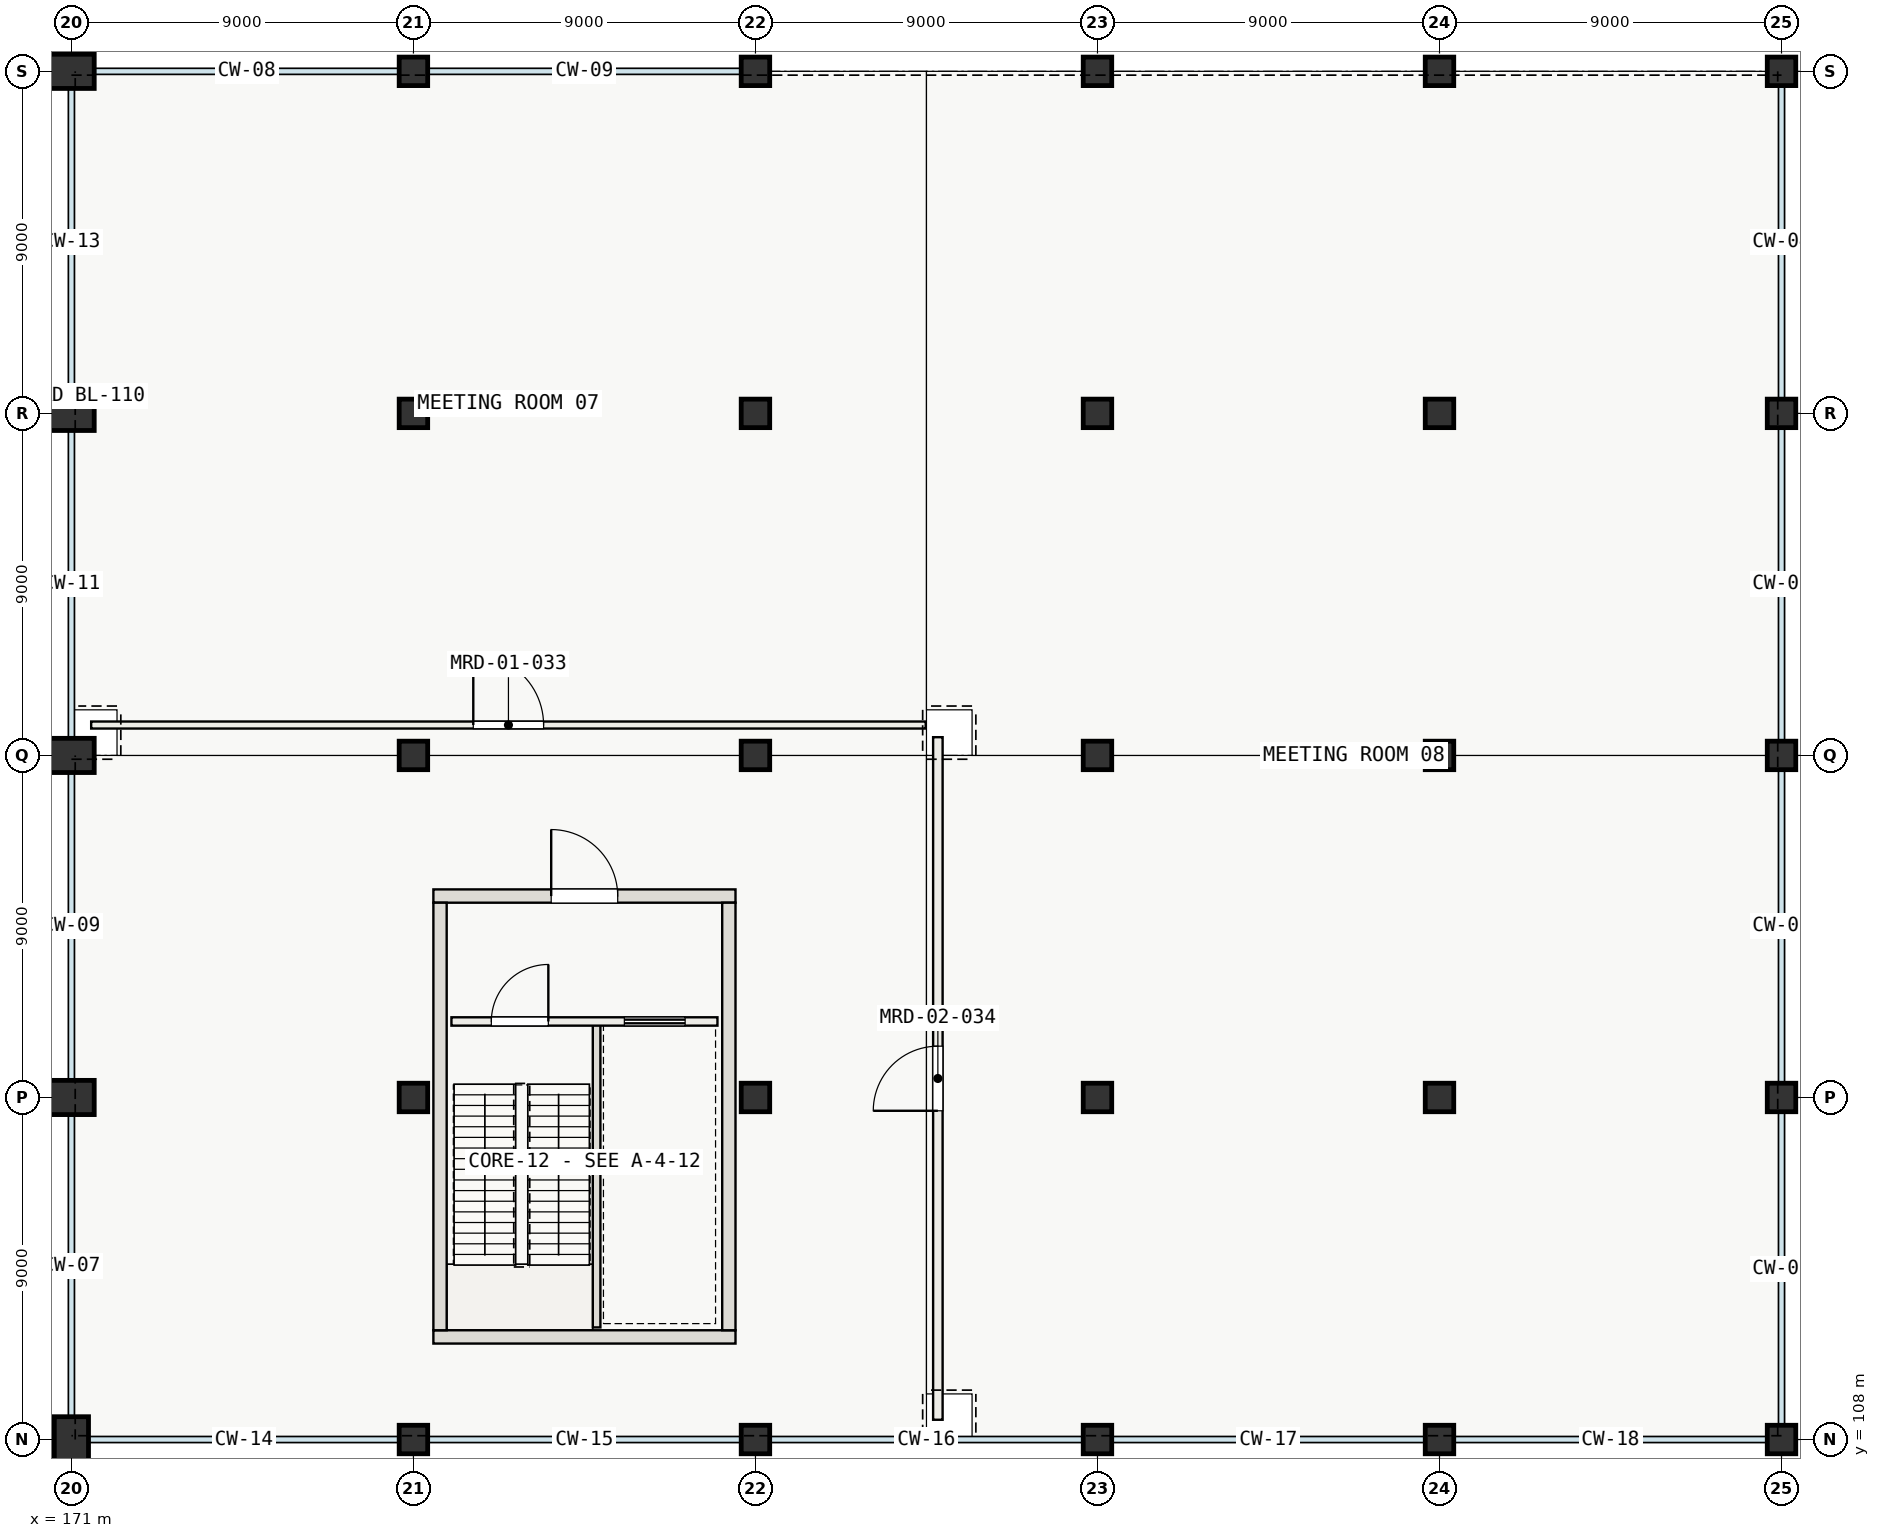
"""IFC4 building model, lengths in metres.
Left out: names, types, materials, properties, quantities, classifications, styles, units other than length and angle.
Written with IfcOpenShell. Run it as: python <this file> out.ifc"""

import sys

from ifc_helpers import new_model, si_unit, direction, frame, frame_2d, origin, origin_2d, place, context, subcontext, project, spatial, rectangle, extrude, element, fill, save


model = new_model("IFC4")
c1 = context("Model", 3, precision=1e-05, world=origin(), true_north=direction((0.0, 1.0)))
c2 = subcontext(c1, "Body", "Model", "MODEL_VIEW")
j1 = project(units=[si_unit("LENGTHUNIT", "METRE"), si_unit("PLANEANGLEUNIT", "RADIAN")], contexts=[c1])
p1 = place(None, origin())
s1 = spatial("IfcSite", under=j1, at=p1, CompositionType="ELEMENT")
p2 = place(p1, origin())
s2 = spatial("IfcBuilding", under=s1, at=p2, CompositionType="ELEMENT")
p3 = place(p2, frame((0.0, 0.0, 6.0)))
s3 = spatial("IfcBuildingStorey", under=s2, at=p3, CompositionType="ELEMENT", Elevation=6.0)
p4 = place(p3, frame((180.525, 110.7, 0.0), z_axis=(0.0, 0.0, 1.0), x_axis=(1.0, 0.0, 0.0)))
e1 = element("IfcWall", 1, at=p4, inside=s3, PredefinedType="SHEAR", context=c2, shape_type="SweptSolid", body=[
    extrude(rectangle(XDim=7.95, YDim=0.35, at=frame_2d((3.975, 0.0))), origin(), (0.0, 0.0, 1.0), 6.0),
])
p5 = place(p3, frame((180.525, 122.3, 0.0), z_axis=(0.0, 0.0, 1.0), x_axis=(1.0, 0.0, 0.0)))
e2 = element("IfcWall", 2, at=p5, inside=s3, PredefinedType="SHEAR", context=c2, shape_type="SweptSolid", body=[
    extrude(rectangle(XDim=7.95, YDim=0.35, at=frame_2d((3.975, 0.0))), origin(), (0.0, 0.0, 1.0), 6.0),
])
p6 = place(p5, frame((3.1, 0.0, 0.0)))
e3 = element("IfcOpeningElement", 3, at=p6, cuts=e2, PredefinedType="OPENING", context=c2, shape_type="SweptSolid", body=[
    extrude(rectangle(XDim=1.75, YDim=2.3, at=frame_2d((0.875, 1.15))), frame((0.0, 0.185, 0.0), z_axis=(0.0, -1.0, 0.0), x_axis=(1.0, 0.0, 0.0)), (0.0, 0.0, 1.0), 0.37),
])
for number, where, z_axis, x_axis in (
    (4, (180.7, 110.875, 0.0), (0.0, 0.0, 1.0), (0.0, 1.0, 0.0)),
    (5, (188.3, 110.875, 0.0), (0.0, 0.0, 1.0), (0.0, 1.0, 0.0)),
):
    element("IfcWall", number, at=place(p3, frame(where, z_axis=z_axis, x_axis=x_axis)), inside=s3, PredefinedType="SHEAR", context=c2, shape_type="SweptSolid", body=[
        extrude(rectangle(XDim=11.25, YDim=0.35, at=frame_2d((5.625, 0.0))), origin(), (0.0, 0.0, 1.0), 6.0),
    ])
for number, where, z_axis, x_axis in (
    (6, (171.0, 108.0, 0.0), (0.0, 0.0, 1.0), (0.0, 1.0, 0.0)),
    (7, (171.0, 117.0, 0.0), (0.0, 0.0, 1.0), (1.0, 0.0, 0.0)),
    (8, (171.0, 126.0, 0.0), (0.0, 0.0, 1.0), (1.0, 0.0, 0.0)),
    (9, (171.0, 135.0, 0.0), (0.0, 0.0, 1.0), (1.0, 0.0, 0.0)),
    (10, (171.0, 144.0, 0.0), (0.0, 0.0, 1.0), (1.0, 0.0, 0.0)),
):
    element("IfcColumn", number, at=place(p3, frame(where, z_axis=z_axis, x_axis=x_axis)), inside=s3, PredefinedType="COLUMN", context=c2, shape_type="SweptSolid", body=[
        extrude(rectangle(XDim=1.2, YDim=0.9, at=origin_2d()), origin(), (0.0, 0.0, 1.0), 6.0),
    ])
for number, where, z_axis, x_axis in (
    (11, (180.0, 108.0, 0.0), (0.0, 0.0, 1.0), (1.0, 0.0, 0.0)),
    (12, (180.0, 117.0, 0.0), (0.0, 0.0, 1.0), (1.0, 0.0, 0.0)),
    (13, (180.0, 126.0, 0.0), (0.0, 0.0, 1.0), (1.0, 0.0, 0.0)),
    (14, (180.0, 135.0, 0.0), (0.0, 0.0, 1.0), (1.0, 0.0, 0.0)),
    (15, (180.0, 144.0, 0.0), (0.0, 0.0, 1.0), (1.0, 0.0, 0.0)),
    (16, (189.0, 108.0, 0.0), (0.0, 0.0, 1.0), (1.0, 0.0, 0.0)),
    (17, (189.0, 117.0, 0.0), (0.0, 0.0, 1.0), (1.0, 0.0, 0.0)),
    (18, (189.0, 126.0, 0.0), (0.0, 0.0, 1.0), (1.0, 0.0, 0.0)),
    (19, (189.0, 135.0, 0.0), (0.0, 0.0, 1.0), (1.0, 0.0, 0.0)),
    (20, (189.0, 144.0, 0.0), (0.0, 0.0, 1.0), (1.0, 0.0, 0.0)),
    (21, (198.0, 108.0, 0.0), (0.0, 0.0, 1.0), (1.0, 0.0, 0.0)),
    (22, (198.0, 117.0, 0.0), (0.0, 0.0, 1.0), (1.0, 0.0, 0.0)),
    (23, (198.0, 126.0, 0.0), (0.0, 0.0, 1.0), (1.0, 0.0, 0.0)),
    (24, (198.0, 135.0, 0.0), (0.0, 0.0, 1.0), (1.0, 0.0, 0.0)),
    (25, (198.0, 144.0, 0.0), (0.0, 0.0, 1.0), (1.0, 0.0, 0.0)),
    (26, (207.0, 108.0, 0.0), (0.0, 0.0, 1.0), (1.0, 0.0, 0.0)),
    (27, (207.0, 117.0, 0.0), (0.0, 0.0, 1.0), (1.0, 0.0, 0.0)),
    (28, (207.0, 126.0, 0.0), (0.0, 0.0, 1.0), (1.0, 0.0, 0.0)),
    (29, (207.0, 135.0, 0.0), (0.0, 0.0, 1.0), (1.0, 0.0, 0.0)),
    (30, (207.0, 144.0, 0.0), (0.0, 0.0, 1.0), (1.0, 0.0, 0.0)),
    (31, (216.0, 108.0, 0.0), (0.0, 0.0, 1.0), (1.0, 0.0, 0.0)),
    (32, (216.0, 117.0, 0.0), (0.0, 0.0, 1.0), (1.0, 0.0, 0.0)),
    (33, (216.0, 126.0, 0.0), (0.0, 0.0, 1.0), (1.0, 0.0, 0.0)),
    (34, (216.0, 135.0, 0.0), (0.0, 0.0, 1.0), (1.0, 0.0, 0.0)),
    (35, (216.0, 144.0, 0.0), (0.0, 0.0, 1.0), (1.0, 0.0, 0.0)),
):
    element("IfcColumn", number, at=place(p3, frame(where, z_axis=z_axis, x_axis=x_axis)), inside=s3, PredefinedType="COLUMN", context=c2, shape_type="SweptSolid", body=[
        extrude(rectangle(XDim=0.75, YDim=0.75, at=origin_2d()), origin(), (0.0, 0.0, 1.0), 6.0),
    ])
p7 = place(p3, frame((184.82, 110.95, 0.0), z_axis=(0.0, 0.0, 1.0), x_axis=(0.0, 1.0, 0.0)))
e36 = element("IfcWall", 36, at=p7, inside=s3, PredefinedType="SOLIDWALL", context=c2, shape_type="SweptSolid", body=[
    extrude(rectangle(XDim=8.0, YDim=0.2, at=frame_2d((4.0, 0.0))), origin(), (0.0, 0.0, 1.0), 6.0),
])
p8 = place(p3, frame((181.0, 119.0, 0.0), z_axis=(0.0, 0.0, 1.0), x_axis=(1.0, 0.0, 0.0)))
e37 = element("IfcWall", 37, at=p8, inside=s3, PredefinedType="SOLIDWALL", context=c2, shape_type="SweptSolid", body=[
    extrude(rectangle(XDim=7.0, YDim=0.22, at=frame_2d((3.5, 0.0))), origin(), (0.0, 0.0, 1.0), 5.62),
])
p9 = place(p8, frame((1.05, 0.0, 0.0)))
e38 = element("IfcOpeningElement", 38, at=p9, cuts=e37, PredefinedType="OPENING", context=c2, shape_type="SweptSolid", body=[
    extrude(rectangle(XDim=1.5, YDim=2.2, at=frame_2d((0.75, 1.1))), frame((0.0, 0.12, 0.0), z_axis=(0.0, -1.0, 0.0), x_axis=(1.0, 0.0, 0.0)), (0.0, 0.0, 1.0), 0.24),
])
p10 = place(p8, frame((4.55, 0.0, 0.0)))
e39 = element("IfcOpeningElement", 39, at=p10, cuts=e37, PredefinedType="OPENING", context=c2, shape_type="SweptSolid", body=[
    extrude(rectangle(XDim=1.6, YDim=2.3, at=frame_2d((0.8, 1.15))), frame((0.0, 0.12, 0.0), z_axis=(0.0, -1.0, 0.0), x_axis=(1.0, 0.0, 0.0)), (0.0, 0.0, 1.0), 0.24),
])
p11 = place(p3, frame((171.52, 126.8, 0.0), z_axis=(0.0, 0.0, 1.0), x_axis=(1.0, 0.0, 0.0)))
e40 = element("IfcWall", 40, at=p11, inside=s3, PredefinedType="PARTITIONING", context=c2, shape_type="SweptSolid", body=[
    extrude(rectangle(XDim=21.96, YDim=0.185, at=frame_2d((10.98, 0.0))), origin(), (0.0, 0.0, 1.0), 4.64),
])
p12 = place(p11, frame((10.055, 0.0, 0.0)))
e41 = element("IfcOpeningElement", 41, at=p12, cuts=e40, PredefinedType="OPENING", context=c2, shape_type="SweptSolid", body=[
    extrude(rectangle(XDim=1.85, YDim=2.3, at=frame_2d((0.925, 1.15))), frame((0.0, 0.103, 0.0), z_axis=(0.0, -1.0, 0.0), x_axis=(1.0, 0.0, 0.0)), (0.0, 0.0, 1.0), 0.205),
])
p13 = place(p3, frame((193.8, 108.52, 0.0), z_axis=(0.0, 0.0, 1.0), x_axis=(0.0, 1.0, 0.0)))
e42 = element("IfcWall", 42, at=p13, inside=s3, PredefinedType="PARTITIONING", context=c2, shape_type="SweptSolid", body=[
    extrude(rectangle(XDim=17.96, YDim=0.25, at=frame_2d((8.98, 0.0))), origin(), (0.0, 0.0, 1.0), 4.64),
])
p14 = place(p13, frame((8.13, 0.0, 0.0)))
e43 = element("IfcOpeningElement", 43, at=p14, cuts=e42, PredefinedType="OPENING", context=c2, shape_type="SweptSolid", body=[
    extrude(rectangle(XDim=1.7, YDim=2.25, at=frame_2d((0.85, 1.125))), frame((0.0, 0.135, 0.0), z_axis=(0.0, -1.0, 0.0), x_axis=(1.0, 0.0, 0.0)), (0.0, 0.0, 1.0), 0.27),
])
p15 = place(p9, origin())
e44 = element("IfcDoor", 44, at=p15, inside=s3, OperationType="SINGLE_SWING_RIGHT", PredefinedType="DOOR", context=c2, shape_type="SweptSolid", body=[
    extrude(rectangle(XDim=1.5, YDim=2.2, at=frame_2d((0.75, 1.1))), frame((0.0, 0.025, 0.0), z_axis=(0.0, -1.0, 0.0), x_axis=(1.0, 0.0, 0.0)), (0.0, 0.0, 1.0), 0.05),
])
fill(e38, e44)
p16 = place(p10, origin())
e45 = element("IfcDoor", 45, at=p16, inside=s3, OperationType="SLIDING_TO_RIGHT", PredefinedType="DOOR", context=c2, shape_type="SweptSolid", body=[
    extrude(rectangle(XDim=1.6, YDim=2.3, at=frame_2d((0.8, 1.15))), frame((0.0, 0.025, 0.0), z_axis=(0.0, -1.0, 0.0), x_axis=(1.0, 0.0, 0.0)), (0.0, 0.0, 1.0), 0.05),
])
fill(e39, e45)
p17 = place(p6, origin())
e46 = element("IfcDoor", 46, at=p17, inside=s3, OperationType="DOUBLE_DOOR_SINGLE_SWING", PredefinedType="DOOR", context=c2, shape_type="SweptSolid", body=[
    extrude(rectangle(XDim=1.75, YDim=2.3, at=frame_2d((0.875, 1.15))), frame((0.0, 0.025, 0.0), z_axis=(0.0, -1.0, 0.0), x_axis=(1.0, 0.0, 0.0)), (0.0, 0.0, 1.0), 0.05),
])
fill(e3, e46)
p18 = place(p12, origin())
e47 = element("IfcDoor", 47, at=p18, inside=s3, OperationType="DOUBLE_DOOR_SINGLE_SWING", PredefinedType="DOOR", context=c2, shape_type="SweptSolid", body=[
    extrude(rectangle(XDim=1.85, YDim=2.3, at=frame_2d((0.925, 1.15))), frame((0.0, 0.025, 0.0), z_axis=(0.0, -1.0, 0.0), x_axis=(1.0, 0.0, 0.0)), (0.0, 0.0, 1.0), 0.05),
])
fill(e41, e47)
p19 = place(p14, origin())
e48 = element("IfcDoor", 48, at=p19, inside=s3, OperationType="DOUBLE_DOOR_SINGLE_SWING", PredefinedType="DOOR", context=c2, shape_type="SweptSolid", body=[
    extrude(rectangle(XDim=1.7, YDim=2.25, at=frame_2d((0.85, 1.125))), frame((0.0, 0.025, 0.0), z_axis=(0.0, -1.0, 0.0), x_axis=(1.0, 0.0, 0.0)), (0.0, 0.0, 1.0), 0.05),
])
fill(e43, e48)
save(model, sys.argv[1])
